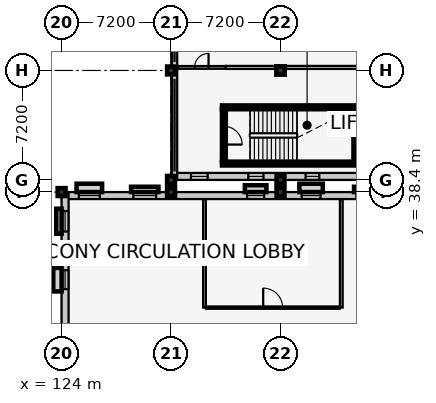
"""IFC4 building model, lengths in metres.
Left out: names, types, materials, properties, quantities, classifications, styles, units other than length and angle.
Written with IfcOpenShell. Run it as: python <this file> out.ifc"""

import sys

from ifc_helpers import new_model, si_unit, direction, frame, frame_2d, origin, origin_2d, place, context, subcontext, project, spatial, rectangle, extrude, element, fill, save


model = new_model("IFC4")
c1 = context("Model", 3, precision=1e-05, world=origin(), true_north=direction((0.0, 1.0)))
c2 = subcontext(c1, "Body", "Model", "MODEL_VIEW")
j1 = project(units=[si_unit("LENGTHUNIT", "METRE"), si_unit("PLANEANGLEUNIT", "RADIAN")], contexts=[c1])
p1 = place(None, origin())
s1 = spatial("IfcSite", under=j1, at=p1, CompositionType="ELEMENT")
p2 = place(p1, origin())
s2 = spatial("IfcBuilding", under=s1, at=p2, CompositionType="ELEMENT")
p3 = place(p2, frame((0.0, 0.0, 5.4)))
s3 = spatial("IfcBuildingStorey", under=s2, at=p3, CompositionType="ELEMENT", Elevation=5.4)
for number, where, z_axis, x_axis in (
    (1, (124.0, 38.4, 0.0), (0.0, 0.0, 1.0), (1.0, 0.0, 0.0)),
    (2, (131.2, 38.4, 0.0), (0.0, 0.0, 1.0), (1.0, 0.0, 0.0)),
    (3, (138.4, 38.4, 0.0), (0.0, 0.0, 1.0), (1.0, 0.0, 0.0)),
    (4, (131.2, 39.2, 0.0), (0.0, 0.0, 1.0), (1.0, 0.0, 0.0)),
    (5, (131.2, 46.4, 0.0), (0.0, 0.0, 1.0), (1.0, 0.0, 0.0)),
    (6, (138.4, 39.2, 0.0), (0.0, 0.0, 1.0), (1.0, 0.0, 0.0)),
):
    element("IfcColumn", number, at=place(p3, frame(where, z_axis=z_axis, x_axis=x_axis)), inside=s3, PredefinedType="COLUMN", context=c2, shape_type="SweptSolid", body=[
        extrude(rectangle(XDim=0.52, YDim=0.52, at=origin_2d()), origin(), (0.0, 0.0, 1.0), 4.2),
    ])
p4 = place(p3, frame((138.4, 46.4, 0.0), z_axis=(0.0, 0.0, 1.0), x_axis=(1.0, 0.0, 0.0)))
e7 = element("IfcColumn", 7, at=p4, inside=s3, PredefinedType="COLUMN", context=c2, shape_type="SweptSolid", body=[
    extrude(rectangle(XDim=0.55, YDim=0.55, at=origin_2d()), origin(), (0.0, 0.0, 1.0), 4.2),
])
p5 = place(p3, frame((124.0, 38.17, 0.0), z_axis=(0.0, 0.0, 1.0), x_axis=(1.0, 0.0, 0.0)))
e8 = element("IfcWall", 8, at=p5, inside=s3, PredefinedType="SOLIDWALL", context=c2, shape_type="SweptSolid", body=[
    extrude(rectangle(XDim=62.0, YDim=0.46, at=frame_2d((31.0, 0.0))), origin(), (0.0, 0.0, 1.0), 3.095),
])
p6 = place(p5, frame((1.134, 0.0, 0.9)))
e9 = element("IfcOpeningElement", 9, at=p6, cuts=e8, PredefinedType="OPENING", context=c2, shape_type="SweptSolid", body=[
    extrude(rectangle(XDim=1.38, YDim=1.6, at=frame_2d((0.69, 0.8))), frame((0.0, 0.242, 0.0), z_axis=(0.0, -1.0, 0.0), x_axis=(1.0, 0.0, 0.0)), (0.0, 0.0, 1.0), 0.484),
])
p7 = place(p5, frame((4.721, 0.0, 0.9)))
e10 = element("IfcOpeningElement", 10, at=p7, cuts=e8, PredefinedType="OPENING", context=c2, shape_type="SweptSolid", body=[
    extrude(rectangle(XDim=1.5, YDim=1.6, at=frame_2d((0.75, 0.8))), frame((0.0, 0.242, 0.0), z_axis=(0.0, -1.0, 0.0), x_axis=(1.0, 0.0, 0.0)), (0.0, 0.0, 1.0), 0.484),
])
p8 = place(p5, frame((12.205, 0.0, 0.9)))
e11 = element("IfcOpeningElement", 11, at=p8, cuts=e8, PredefinedType="OPENING", context=c2, shape_type="SweptSolid", body=[
    extrude(rectangle(XDim=1.12, YDim=1.75, at=frame_2d((0.56, 0.875))), frame((0.0, 0.242, 0.0), z_axis=(0.0, -1.0, 0.0), x_axis=(1.0, 0.0, 0.0)), (0.0, 0.0, 1.0), 0.484),
])
p9 = place(p5, frame((15.792, 0.0, 0.9)))
e12 = element("IfcOpeningElement", 12, at=p9, cuts=e8, PredefinedType="OPENING", context=c2, shape_type="SweptSolid", body=[
    extrude(rectangle(XDim=1.24, YDim=1.75, at=frame_2d((0.62, 0.875))), frame((0.0, 0.242, 0.0), z_axis=(0.0, -1.0, 0.0), x_axis=(1.0, 0.0, 0.0)), (0.0, 0.0, 1.0), 0.484),
])
p10 = place(p5, frame((19.389, 0.0, 0.9)))
e13 = element("IfcOpeningElement", 13, at=p10, cuts=e8, PredefinedType="OPENING", context=c2, shape_type="SweptSolid", body=[
    extrude(rectangle(XDim=1.34, YDim=1.75, at=frame_2d((0.67, 0.875))), frame((0.0, 0.242, 0.0), z_axis=(0.0, -1.0, 0.0), x_axis=(1.0, 0.0, 0.0)), (0.0, 0.0, 1.0), 0.484),
])
p11 = place(p5, frame((34.147, 0.0, 0.9)))
e14 = element("IfcOpeningElement", 14, at=p11, cuts=e8, PredefinedType="OPENING", context=c2, shape_type="SweptSolid", body=[
    extrude(rectangle(XDim=1.0, YDim=1.35, at=frame_2d((0.5, 0.675))), frame((0.0, 0.242, 0.0), z_axis=(0.0, -1.0, 0.0), x_axis=(1.0, 0.0, 0.0)), (0.0, 0.0, 1.0), 0.484),
])
p12 = place(p5, frame((37.744, 0.0, 0.9)))
e15 = element("IfcOpeningElement", 15, at=p12, cuts=e8, PredefinedType="OPENING", context=c2, shape_type="SweptSolid", body=[
    extrude(rectangle(XDim=1.1, YDim=1.35, at=frame_2d((0.55, 0.675))), frame((0.0, 0.242, 0.0), z_axis=(0.0, -1.0, 0.0), x_axis=(1.0, 0.0, 0.0)), (0.0, 0.0, 1.0), 0.484),
])
p13 = place(p5, frame((48.535, 0.0, 0.9)))
e16 = element("IfcOpeningElement", 16, at=p13, cuts=e8, PredefinedType="OPENING", context=c2, shape_type="SweptSolid", body=[
    extrude(rectangle(XDim=1.4, YDim=1.35, at=frame_2d((0.7, 0.675))), frame((0.0, 0.242, 0.0), z_axis=(0.0, -1.0, 0.0), x_axis=(1.0, 0.0, 0.0)), (0.0, 0.0, 1.0), 0.484),
])
p14 = place(p5, frame((59.602, 0.0, 0.9)))
e17 = element("IfcOpeningElement", 17, at=p14, cuts=e8, PredefinedType="OPENING", context=c2, shape_type="SweptSolid", body=[
    extrude(rectangle(XDim=1.15, YDim=1.45, at=frame_2d((0.575, 0.725))), frame((0.0, 0.242, 0.0), z_axis=(0.0, -1.0, 0.0), x_axis=(1.0, 0.0, 0.0)), (0.0, 0.0, 1.0), 0.484),
])
p15 = place(p3, frame((124.23, 0.0, 0.0), z_axis=(0.0, 0.0, 1.0), x_axis=(0.0, 1.0, 0.0)))
e18 = element("IfcWall", 18, at=p15, inside=s3, PredefinedType="SOLIDWALL", context=c2, shape_type="SweptSolid", body=[
    extrude(rectangle(XDim=38.4, YDim=0.46, at=frame_2d((19.2, 0.0))), origin(), (0.0, 0.0, 1.0), 3.095),
])
p16 = place(p15, frame((32.015, 0.0, 0.9)))
e19 = element("IfcOpeningElement", 19, at=p16, cuts=e18, PredefinedType="OPENING", context=c2, shape_type="SweptSolid", body=[
    extrude(rectangle(XDim=1.25, YDim=1.45, at=frame_2d((0.625, 0.725))), frame((0.0, 0.242, 0.0), z_axis=(0.0, -1.0, 0.0), x_axis=(1.0, 0.0, 0.0)), (0.0, 0.0, 1.0), 0.484),
])
p17 = place(p15, frame((35.805, 0.0, 0.9)))
e20 = element("IfcOpeningElement", 20, at=p17, cuts=e18, PredefinedType="OPENING", context=c2, shape_type="SweptSolid", body=[
    extrude(rectangle(XDim=1.35, YDim=1.45, at=frame_2d((0.675, 0.725))), frame((0.0, 0.242, 0.0), z_axis=(0.0, -1.0, 0.0), x_axis=(1.0, 0.0, 0.0)), (0.0, 0.0, 1.0), 0.484),
])
p18 = place(p3, frame((168.4, 39.43, 0.0), z_axis=(0.0, 0.0, 1.0), x_axis=(-1.0, 0.0, 0.0)))
e21 = element("IfcWall", 21, at=p18, inside=s3, PredefinedType="SOLIDWALL", context=c2, shape_type="SweptSolid", body=[
    extrude(rectangle(XDim=37.2, YDim=0.46, at=frame_2d((18.6, 0.0))), origin(), (0.0, 0.0, 1.0), 3.115),
])
p19 = place(p18, frame((1.11, 0.0, 0.9)))
e22 = element("IfcOpeningElement", 22, at=p19, cuts=e21, PredefinedType="OPENING", context=c2, shape_type="SweptSolid", body=[
    extrude(rectangle(XDim=1.5, YDim=1.6, at=frame_2d((0.75, 0.8))), frame((0.0, 0.242, 0.0), z_axis=(0.0, -1.0, 0.0), x_axis=(1.0, 0.0, 0.0)), (0.0, 0.0, 1.0), 0.484),
])
p20 = place(p18, frame((5.08, 0.0, 0.9)))
e23 = element("IfcOpeningElement", 23, at=p20, cuts=e21, PredefinedType="OPENING", context=c2, shape_type="SweptSolid", body=[
    extrude(rectangle(XDim=1.0, YDim=1.75, at=frame_2d((0.5, 0.875))), frame((0.0, 0.242, 0.0), z_axis=(0.0, -1.0, 0.0), x_axis=(1.0, 0.0, 0.0)), (0.0, 0.0, 1.0), 0.484),
])
p21 = place(p18, frame((12.4, 0.0, 0.9)))
e24 = element("IfcOpeningElement", 24, at=p21, cuts=e21, PredefinedType="OPENING", context=c2, shape_type="SweptSolid", body=[
    extrude(rectangle(XDim=1.24, YDim=1.75, at=frame_2d((0.62, 0.875))), frame((0.0, 0.242, 0.0), z_axis=(0.0, -1.0, 0.0), x_axis=(1.0, 0.0, 0.0)), (0.0, 0.0, 1.0), 0.484),
])
p22 = place(p18, frame((19.74, 0.0, 0.9)))
e25 = element("IfcOpeningElement", 25, at=p22, cuts=e21, PredefinedType="OPENING", context=c2, shape_type="SweptSolid", body=[
    extrude(rectangle(XDim=1.44, YDim=1.75, at=frame_2d((0.72, 0.875))), frame((0.0, 0.242, 0.0), z_axis=(0.0, -1.0, 0.0), x_axis=(1.0, 0.0, 0.0)), (0.0, 0.0, 1.0), 0.484),
])
p23 = place(p18, frame((27.45, 0.0, 0.9)))
e26 = element("IfcOpeningElement", 26, at=p23, cuts=e21, PredefinedType="OPENING", context=c2, shape_type="SweptSolid", body=[
    extrude(rectangle(XDim=0.9, YDim=1.35, at=frame_2d((0.45, 0.675))), frame((0.0, 0.242, 0.0), z_axis=(0.0, -1.0, 0.0), x_axis=(1.0, 0.0, 0.0)), (0.0, 0.0, 1.0), 0.484),
])
p24 = place(p18, frame((31.12, 0.0, 0.9)))
e27 = element("IfcOpeningElement", 27, at=p24, cuts=e21, PredefinedType="OPENING", context=c2, shape_type="SweptSolid", body=[
    extrude(rectangle(XDim=1.0, YDim=1.35, at=frame_2d((0.5, 0.675))), frame((0.0, 0.242, 0.0), z_axis=(0.0, -1.0, 0.0), x_axis=(1.0, 0.0, 0.0)), (0.0, 0.0, 1.0), 0.484),
])
p25 = place(p18, frame((34.79, 0.0, 0.9)))
e28 = element("IfcOpeningElement", 28, at=p25, cuts=e21, PredefinedType="OPENING", context=c2, shape_type="SweptSolid", body=[
    extrude(rectangle(XDim=1.1, YDim=1.35, at=frame_2d((0.55, 0.675))), frame((0.0, 0.242, 0.0), z_axis=(0.0, -1.0, 0.0), x_axis=(1.0, 0.0, 0.0)), (0.0, 0.0, 1.0), 0.484),
])
p26 = place(p3, frame((131.43, 39.2, 0.0), z_axis=(0.0, 0.0, 1.0), x_axis=(0.0, 1.0, 0.0)))
e29 = element("IfcWall", 29, at=p26, inside=s3, PredefinedType="SOLIDWALL", context=c2, shape_type="SweptSolid", body=[
    extrude(rectangle(XDim=21.6, YDim=0.35, at=frame_2d((10.8, 0.0))), origin(), (0.0, 0.0, 1.0), 0.85),
])
p27 = place(p3, frame((134.55, 40.275, 0.0), z_axis=(0.0, 0.0, 1.0), x_axis=(1.0, 0.0, 0.0)))
e30 = element("IfcWall", 30, at=p27, inside=s3, PredefinedType="SHEAR", context=c2, shape_type="SweptSolid", body=[
    extrude(rectangle(XDim=9.47, YDim=0.25, at=frame_2d((4.735, 0.0))), origin(), (0.0, 0.0, 1.0), 3.96),
])
p28 = place(p3, frame((143.45, 43.975, 0.0), z_axis=(0.0, 0.0, 1.0), x_axis=(-1.0, 0.0, 0.0)))
e31 = element("IfcWall", 31, at=p28, inside=s3, PredefinedType="SHEAR", context=c2, shape_type="SweptSolid", body=[
    extrude(rectangle(XDim=8.9, YDim=0.25, at=frame_2d((4.45, 0.0))), origin(), (0.0, 0.0, 1.0), 3.96),
])
p29 = place(p3, frame((134.675, 43.85, 0.0), z_axis=(0.0, 0.0, 1.0), x_axis=(0.0, -1.0, 0.0)))
e32 = element("IfcWall", 32, at=p29, inside=s3, PredefinedType="SHEAR", context=c2, shape_type="SweptSolid", body=[
    extrude(rectangle(XDim=3.45, YDim=0.25, at=frame_2d((1.725, 0.0))), origin(), (0.0, 0.0, 1.0), 3.96),
])
p30 = place(p29, frame((1.125, 0.0, 0.0)))
e33 = element("IfcOpeningElement", 33, at=p30, cuts=e32, PredefinedType="OPENING", context=c2, shape_type="SweptSolid", body=[
    extrude(rectangle(XDim=1.2, YDim=2.15, at=frame_2d((0.6, 1.075))), frame((0.0, 0.137, 0.0), z_axis=(0.0, -1.0, 0.0), x_axis=(1.0, 0.0, 0.0)), (0.0, 0.0, 1.0), 0.274),
])
p31 = place(p3, frame((143.325, 40.4, 0.0), z_axis=(0.0, 0.0, 1.0), x_axis=(0.0, 1.0, 0.0)))
e34 = element("IfcWall", 34, at=p31, inside=s3, PredefinedType="SHEAR", context=c2, shape_type="SweptSolid", body=[
    extrude(rectangle(XDim=3.45, YDim=0.25, at=frame_2d((1.725, 0.0))), origin(), (0.0, 0.0, 1.0), 3.96),
])
for number, where, z_axis, x_axis in (
    (35, (142.4, 30.8, 0.0), (0.0, 0.0, 1.0), (0.0, 1.0, 0.0)),
    (36, (133.4, 30.8, 0.0), (0.0, 0.0, 1.0), (0.0, 1.0, 0.0)),
):
    element("IfcWall", number, at=place(p3, frame(where, z_axis=z_axis, x_axis=x_axis)), inside=s3, PredefinedType="PARTITIONING", context=c2, shape_type="SweptSolid", body=[
        extrude(rectangle(XDim=7.13, YDim=0.18, at=frame_2d((3.565, 0.0))), origin(), (0.0, 0.0, 1.0), 3.94),
    ])
p32 = place(p3, frame((133.5, 30.8, 0.0), z_axis=(0.0, 0.0, 1.0), x_axis=(1.0, 0.0, 0.0)))
e37 = element("IfcWall", 37, at=p32, inside=s3, PredefinedType="PARTITIONING", context=c2, shape_type="SweptSolid", body=[
    extrude(rectangle(XDim=8.8, YDim=0.15, at=frame_2d((4.4, 0.0))), origin(), (0.0, 0.0, 1.0), 3.94),
])
p33 = place(p32, frame((3.76, 0.0, 0.0)))
e38 = element("IfcOpeningElement", 38, at=p33, cuts=e37, PredefinedType="OPENING", context=c2, shape_type="SweptSolid", body=[
    extrude(rectangle(XDim=1.28, YDim=2.2, at=frame_2d((0.64, 1.1))), frame((0.0, 0.087, 0.0), z_axis=(0.0, -1.0, 0.0), x_axis=(1.0, 0.0, 0.0)), (0.0, 0.0, 1.0), 0.174),
])
p34 = place(p3, frame((131.615, 46.6, 0.0), z_axis=(0.0, 0.0, 1.0), x_axis=(1.0, 0.0, 0.0)))
e39 = element("IfcWall", 39, at=p34, inside=s3, PredefinedType="PARTITIONING", context=c2, shape_type="SweptSolid", body=[
    extrude(rectangle(XDim=3.185, YDim=0.18, at=frame_2d((1.593, 0.0))), origin(), (0.0, 0.0, 1.0), 3.285),
])
p35 = place(p34, frame((1.133, 0.0, 0.0)))
e40 = element("IfcOpeningElement", 40, at=p35, cuts=e39, PredefinedType="OPENING", context=c2, shape_type="SweptSolid", body=[
    extrude(rectangle(XDim=0.92, YDim=2.08, at=frame_2d((0.46, 1.04))), frame((0.0, 0.102, 0.0), z_axis=(0.0, -1.0, 0.0), x_axis=(1.0, 0.0, 0.0)), (0.0, 0.0, 1.0), 0.204),
])
p36 = place(p3, frame((134.8, 46.6, 0.0), z_axis=(0.0, 0.0, 1.0), x_axis=(1.0, 0.0, 0.0)))
e41 = element("IfcWall", 41, at=p36, inside=s3, PredefinedType="PARTITIONING", context=c2, shape_type="SweptSolid", body=[
    extrude(rectangle(XDim=33.13, YDim=0.2, at=frame_2d((16.565, 0.0))), origin(), (0.0, 0.0, 1.0), 2.935),
])
p37 = place(p36, frame((14.16, 0.0, 0.0)))
e42 = element("IfcOpeningElement", 42, at=p37, cuts=e41, PredefinedType="OPENING", context=c2, shape_type="SweptSolid", body=[
    extrude(rectangle(XDim=1.28, YDim=2.2, at=frame_2d((0.64, 1.1))), frame((0.0, 0.112, 0.0), z_axis=(0.0, -1.0, 0.0), x_axis=(1.0, 0.0, 0.0)), (0.0, 0.0, 1.0), 0.224),
])
p38 = place(p36, frame((26.085, 0.0, 0.0)))
e43 = element("IfcOpeningElement", 43, at=p38, cuts=e41, PredefinedType="OPENING", context=c2, shape_type="SweptSolid", body=[
    extrude(rectangle(XDim=1.76, YDim=2.3, at=frame_2d((0.88, 1.15))), frame((0.0, 0.112, 0.0), z_axis=(0.0, -1.0, 0.0), x_axis=(1.0, 0.0, 0.0)), (0.0, 0.0, 1.0), 0.224),
])
p39 = place(p6, origin())
e44 = element("IfcWindow", 44, at=p39, inside=s3, PartitioningType="SINGLE_PANEL", PredefinedType="WINDOW", context=c2, shape_type="SweptSolid", body=[
    extrude(rectangle(XDim=1.38, YDim=1.6, at=frame_2d((0.69, 0.8))), frame((0.0, 0.03, 0.0), z_axis=(0.0, -1.0, 0.0), x_axis=(1.0, 0.0, 0.0)), (0.0, 0.0, 1.0), 0.06),
])
fill(e9, e44)
p40 = place(p7, origin())
e45 = element("IfcWindow", 45, at=p40, inside=s3, PartitioningType="SINGLE_PANEL", PredefinedType="WINDOW", context=c2, shape_type="SweptSolid", body=[
    extrude(rectangle(XDim=1.5, YDim=1.6, at=frame_2d((0.75, 0.8))), frame((0.0, 0.03, 0.0), z_axis=(0.0, -1.0, 0.0), x_axis=(1.0, 0.0, 0.0)), (0.0, 0.0, 1.0), 0.06),
])
fill(e10, e45)
p41 = place(p8, origin())
e46 = element("IfcWindow", 46, at=p41, inside=s3, PartitioningType="SINGLE_PANEL", PredefinedType="WINDOW", context=c2, shape_type="SweptSolid", body=[
    extrude(rectangle(XDim=1.12, YDim=1.75, at=frame_2d((0.56, 0.875))), frame((0.0, 0.03, 0.0), z_axis=(0.0, -1.0, 0.0), x_axis=(1.0, 0.0, 0.0)), (0.0, 0.0, 1.0), 0.06),
])
fill(e11, e46)
p42 = place(p9, origin())
e47 = element("IfcWindow", 47, at=p42, inside=s3, PartitioningType="SINGLE_PANEL", PredefinedType="WINDOW", context=c2, shape_type="SweptSolid", body=[
    extrude(rectangle(XDim=1.24, YDim=1.75, at=frame_2d((0.62, 0.875))), frame((0.0, 0.03, 0.0), z_axis=(0.0, -1.0, 0.0), x_axis=(1.0, 0.0, 0.0)), (0.0, 0.0, 1.0), 0.06),
])
fill(e12, e47)
p43 = place(p10, origin())
e48 = element("IfcWindow", 48, at=p43, inside=s3, PartitioningType="SINGLE_PANEL", PredefinedType="WINDOW", context=c2, shape_type="SweptSolid", body=[
    extrude(rectangle(XDim=1.34, YDim=1.75, at=frame_2d((0.67, 0.875))), frame((0.0, 0.03, 0.0), z_axis=(0.0, -1.0, 0.0), x_axis=(1.0, 0.0, 0.0)), (0.0, 0.0, 1.0), 0.06),
])
fill(e13, e48)
p44 = place(p16, origin())
e49 = element("IfcWindow", 49, at=p44, inside=s3, PartitioningType="SINGLE_PANEL", PredefinedType="WINDOW", context=c2, shape_type="SweptSolid", body=[
    extrude(rectangle(XDim=1.25, YDim=1.45, at=frame_2d((0.625, 0.725))), frame((0.0, 0.03, 0.0), z_axis=(0.0, -1.0, 0.0), x_axis=(1.0, 0.0, 0.0)), (0.0, 0.0, 1.0), 0.06),
])
fill(e19, e49)
p45 = place(p17, origin())
e50 = element("IfcWindow", 50, at=p45, inside=s3, PartitioningType="SINGLE_PANEL", PredefinedType="WINDOW", context=c2, shape_type="SweptSolid", body=[
    extrude(rectangle(XDim=1.35, YDim=1.45, at=frame_2d((0.675, 0.725))), frame((0.0, 0.03, 0.0), z_axis=(0.0, -1.0, 0.0), x_axis=(1.0, 0.0, 0.0)), (0.0, 0.0, 1.0), 0.06),
])
fill(e20, e50)
p46 = place(p23, origin())
e51 = element("IfcWindow", 51, at=p46, inside=s3, PartitioningType="SINGLE_PANEL", PredefinedType="WINDOW", context=c2, shape_type="SweptSolid", body=[
    extrude(rectangle(XDim=0.9, YDim=1.35, at=frame_2d((0.45, 0.675))), frame((0.0, 0.03, 0.0), z_axis=(0.0, -1.0, 0.0), x_axis=(1.0, 0.0, 0.0)), (0.0, 0.0, 1.0), 0.06),
])
fill(e26, e51)
p47 = place(p24, origin())
e52 = element("IfcWindow", 52, at=p47, inside=s3, PartitioningType="SINGLE_PANEL", PredefinedType="WINDOW", context=c2, shape_type="SweptSolid", body=[
    extrude(rectangle(XDim=1.0, YDim=1.35, at=frame_2d((0.5, 0.675))), frame((0.0, 0.03, 0.0), z_axis=(0.0, -1.0, 0.0), x_axis=(1.0, 0.0, 0.0)), (0.0, 0.0, 1.0), 0.06),
])
fill(e27, e52)
p48 = place(p25, origin())
e53 = element("IfcWindow", 53, at=p48, inside=s3, PartitioningType="SINGLE_PANEL", PredefinedType="WINDOW", context=c2, shape_type="SweptSolid", body=[
    extrude(rectangle(XDim=1.1, YDim=1.35, at=frame_2d((0.55, 0.675))), frame((0.0, 0.03, 0.0), z_axis=(0.0, -1.0, 0.0), x_axis=(1.0, 0.0, 0.0)), (0.0, 0.0, 1.0), 0.06),
])
fill(e28, e53)
p49 = place(p30, origin())
e54 = element("IfcDoor", 54, at=p49, inside=s3, OperationType="SINGLE_SWING_RIGHT", PredefinedType="DOOR", context=c2, shape_type="SweptSolid", body=[
    extrude(rectangle(XDim=1.2, YDim=2.15, at=frame_2d((0.6, 1.075))), frame((0.0, 0.025, 0.0), z_axis=(0.0, -1.0, 0.0), x_axis=(1.0, 0.0, 0.0)), (0.0, 0.0, 1.0), 0.05),
])
fill(e33, e54)
p50 = place(p33, origin())
e55 = element("IfcDoor", 55, at=p50, inside=s3, OperationType="SINGLE_SWING_LEFT", PredefinedType="DOOR", context=c2, shape_type="SweptSolid", body=[
    extrude(rectangle(XDim=1.28, YDim=2.2, at=frame_2d((0.64, 1.1))), frame((0.0, 0.025, 0.0), z_axis=(0.0, -1.0, 0.0), x_axis=(1.0, 0.0, 0.0)), (0.0, 0.0, 1.0), 0.05),
])
fill(e38, e55)
p51 = place(p35, origin())
e56 = element("IfcDoor", 56, at=p51, inside=s3, OperationType="SINGLE_SWING_RIGHT", PredefinedType="DOOR", context=c2, shape_type="SweptSolid", body=[
    extrude(rectangle(XDim=0.92, YDim=2.08, at=frame_2d((0.46, 1.04))), frame((0.0, 0.025, 0.0), z_axis=(0.0, -1.0, 0.0), x_axis=(1.0, 0.0, 0.0)), (0.0, 0.0, 1.0), 0.05),
])
fill(e40, e56)
save(model, sys.argv[1])
